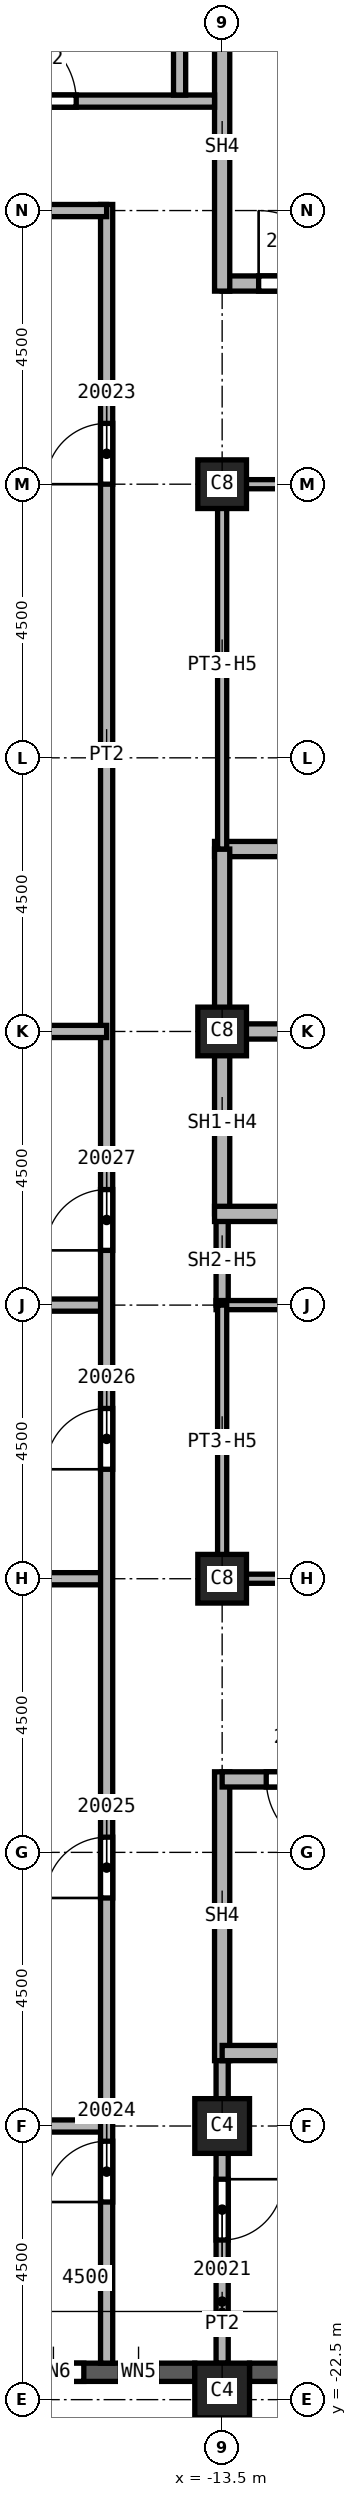
"""IFC4 building model, lengths in metres.
Left out: names, types, materials, properties, quantities, classifications, styles, units other than length and angle.
Written with IfcOpenShell. Run it as: python <this file> out.ifc"""

import sys

from ifc_helpers import new_model, si_unit, direction, frame, frame_2d, origin, origin_2d, place, context, subcontext, project, spatial, rectangle, extrude, element, fill, save


model = new_model("IFC4")
c1 = context("Model", 3, precision=1e-05, world=origin(), true_north=direction((0.0, 1.0)))
c2 = subcontext(c1, "Body", "Model", "MODEL_VIEW")
j1 = project(units=[si_unit("LENGTHUNIT", "METRE"), si_unit("PLANEANGLEUNIT", "RADIAN")], contexts=[c1])
p1 = place(None, origin())
s1 = spatial("IfcSite", under=j1, at=p1, CompositionType="ELEMENT")
p2 = place(p1, origin())
s2 = spatial("IfcBuilding", under=s1, at=p2, CompositionType="ELEMENT")
p3 = place(p2, frame((0.0, 0.0, 290.0)))
s3 = spatial("IfcBuildingStorey", under=s2, at=p3, CompositionType="ELEMENT", Elevation=290.0)
p4 = place(p3, frame((-13.5, -18.0, 0.0), z_axis=(0.0, 0.0, 1.0), x_axis=(1.0, 0.0, 0.0)))
e1 = element("IfcColumn", 1, at=p4, inside=s3, PredefinedType="COLUMN", context=c2, shape_type="SweptSolid", body=[
    extrude(rectangle(XDim=0.9, YDim=0.9, at=origin_2d()), origin(), (0.0, 0.0, 1.0), 3.59),
])
for number, where, z_axis, x_axis in (
    (2, (-13.5, 0.0, 0.0), (0.0, 0.0, 1.0), (1.0, 0.0, 0.0)),
    (3, (-13.5, 9.0, 0.0), (0.0, 0.0, 1.0), (1.0, 0.0, 0.0)),
    (4, (-13.5, -9.0, 0.0), (0.0, 0.0, 1.0), (1.0, 0.0, 0.0)),
):
    element("IfcColumn", number, at=place(p3, frame(where, z_axis=z_axis, x_axis=x_axis)), inside=s3, PredefinedType="COLUMN", context=c2, shape_type="SweptSolid", body=[
        extrude(rectangle(XDim=0.8, YDim=0.8, at=origin_2d()), origin(), (0.0, 0.0, 1.0), 3.59),
    ])
p5 = place(p3, frame((-13.5, -22.35, 0.0), z_axis=(0.0, 0.0, 1.0), x_axis=(1.0, 0.0, 0.0)))
e5 = element("IfcColumn", 5, at=p5, inside=s3, PredefinedType="COLUMN", context=c2, shape_type="SweptSolid", body=[
    extrude(rectangle(XDim=0.9, YDim=0.9, at=origin_2d()), origin(), (0.0, 0.0, 1.0), 3.59),
])
p6 = place(p3, frame((-17.55, -22.05, 0.0), z_axis=(0.0, 0.0, 1.0), x_axis=(1.0, 0.0, 0.0)))
e6 = element("IfcWall", 6, at=p6, inside=s3, PredefinedType="SOLIDWALL", context=c2, shape_type="SweptSolid", body=[
    extrude(rectangle(XDim=3.6, YDim=0.3, at=frame_2d((1.8, 0.0))), origin(), (0.0, 0.0, 1.0), 2.99),
])
p7 = place(p6, frame((0.775, 0.0, 0.8)))
e7 = element("IfcOpeningElement", 7, at=p7, cuts=e6, PredefinedType="OPENING", context=c2, shape_type="SweptSolid", body=[
    extrude(rectangle(XDim=1.0, YDim=1.95, at=frame_2d((0.5, 0.975))), frame((0.0, 0.15, 0.0), z_axis=(0.0, -1.0, 0.0), x_axis=(1.0, 0.0, 0.0)), (0.0, 0.0, 1.0), 0.3),
])
p8 = place(p6, frame((2.375, 0.0, 0.8)))
e8 = element("IfcOpeningElement", 8, at=p8, cuts=e6, PredefinedType="OPENING", context=c2, shape_type="SweptSolid", body=[
    extrude(rectangle(XDim=0.6, YDim=1.95, at=frame_2d((0.3, 0.975))), frame((0.0, 0.15, 0.0), z_axis=(0.0, -1.0, 0.0), x_axis=(1.0, 0.0, 0.0)), (0.0, 0.0, 1.0), 0.3),
])
p9 = place(p3, frame((-13.05, -22.05, 0.0), z_axis=(0.0, 0.0, 1.0), x_axis=(1.0, 0.0, 0.0)))
e9 = element("IfcWall", 9, at=p9, inside=s3, PredefinedType="SOLIDWALL", context=c2, shape_type="SweptSolid", body=[
    extrude(rectangle(XDim=3.6, YDim=0.3, at=frame_2d((1.8, 0.0))), origin(), (0.0, 0.0, 1.0), 2.99),
])
p10 = place(p9, frame((0.6, 0.0, 0.8)))
e10 = element("IfcOpeningElement", 10, at=p10, cuts=e9, PredefinedType="OPENING", context=c2, shape_type="SweptSolid", body=[
    extrude(rectangle(XDim=2.4, YDim=1.95, at=frame_2d((1.2, 0.975))), frame((0.0, 0.15, 0.0), z_axis=(0.0, -1.0, 0.0), x_axis=(1.0, 0.0, 0.0)), (0.0, 0.0, 1.0), 0.3),
])
for number, where, z_axis, x_axis in (
    (11, (-26.55, -9.0, 0.0), (0.0, 0.0, 1.0), (1.0, 0.0, 0.0)),
    (12, (-26.55, -4.5, 0.0), (0.0, 0.0, 1.0), (1.0, 0.0, 0.0)),
):
    element("IfcWall", number, at=place(p3, frame(where, z_axis=z_axis, x_axis=x_axis)), inside=s3, PredefinedType="PARTITIONING", context=c2, shape_type="SweptSolid", body=[
        extrude(rectangle(XDim=11.15, YDim=0.2, at=frame_2d((5.575, 0.0))), origin(), (0.0, 0.0, 1.0), 3.59),
    ])
p11 = place(p3, frame((-24.3, -18.0, 0.0), z_axis=(0.0, 0.0, 1.0), x_axis=(1.0, 0.0, 0.0)))
e13 = element("IfcWall", 13, at=p11, inside=s3, PredefinedType="PARTITIONING", context=c2, shape_type="SweptSolid", body=[
    extrude(rectangle(XDim=8.9, YDim=0.2, at=frame_2d((4.45, 0.0))), origin(), (0.0, 0.0, 1.0), 3.59),
])
p12 = place(p3, frame((-15.4, -21.9, 0.0), z_axis=(0.0, 0.0, 1.0), x_axis=(0.0, 1.0, 0.0)))
e14 = element("IfcWall", 14, at=p12, inside=s3, PredefinedType="PARTITIONING", context=c2, shape_type="SweptSolid", body=[
    extrude(rectangle(XDim=35.5, YDim=0.2, at=frame_2d((17.75, 0.0))), origin(), (0.0, 0.0, 1.0), 3.59),
])
p13 = place(p12, frame((30.9, 0.0, 0.0)))
e15 = element("IfcOpeningElement", 15, at=p13, cuts=e14, PredefinedType="OPENING", context=c2, shape_type="SweptSolid", body=[
    extrude(rectangle(XDim=1.0, YDim=2.1, at=frame_2d((0.5, 1.05))), frame((0.0, 0.1, 0.0), z_axis=(0.0, -1.0, 0.0), x_axis=(1.0, 0.0, 0.0)), (0.0, 0.0, 1.0), 0.2),
])
p14 = place(p12, frame((2.65, 0.0, 0.0)))
e16 = element("IfcOpeningElement", 16, at=p14, cuts=e14, PredefinedType="OPENING", context=c2, shape_type="SweptSolid", body=[
    extrude(rectangle(XDim=1.0, YDim=2.1, at=frame_2d((0.5, 1.05))), frame((0.0, 0.1, 0.0), z_axis=(0.0, -1.0, 0.0), x_axis=(1.0, 0.0, 0.0)), (0.0, 0.0, 1.0), 0.2),
])
p15 = place(p12, frame((7.65, 0.0, 0.0)))
e17 = element("IfcOpeningElement", 17, at=p15, cuts=e14, PredefinedType="OPENING", context=c2, shape_type="SweptSolid", body=[
    extrude(rectangle(XDim=1.0, YDim=2.1, at=frame_2d((0.5, 1.05))), frame((0.0, 0.1, 0.0), z_axis=(0.0, -1.0, 0.0), x_axis=(1.0, 0.0, 0.0)), (0.0, 0.0, 1.0), 0.2),
])
p16 = place(p12, frame((14.7, 0.0, 0.0)))
e18 = element("IfcOpeningElement", 18, at=p16, cuts=e14, PredefinedType="OPENING", context=c2, shape_type="SweptSolid", body=[
    extrude(rectangle(XDim=1.0, YDim=2.1, at=frame_2d((0.5, 1.05))), frame((0.0, 0.1, 0.0), z_axis=(0.0, -1.0, 0.0), x_axis=(1.0, 0.0, 0.0)), (0.0, 0.0, 1.0), 0.2),
])
p17 = place(p12, frame((18.3, 0.0, 0.0)))
e19 = element("IfcOpeningElement", 19, at=p17, cuts=e14, PredefinedType="OPENING", context=c2, shape_type="SweptSolid", body=[
    extrude(rectangle(XDim=1.0, YDim=2.1, at=frame_2d((0.5, 1.05))), frame((0.0, 0.1, 0.0), z_axis=(0.0, -1.0, 0.0), x_axis=(1.0, 0.0, 0.0)), (0.0, 0.0, 1.0), 0.2),
])
p18 = place(p3, frame((-15.4, 0.0, 0.0), z_axis=(0.0, 0.0, 1.0), x_axis=(-1.0, 0.0, 0.0)))
e20 = element("IfcWall", 20, at=p18, inside=s3, PredefinedType="PARTITIONING", context=c2, shape_type="SweptSolid", body=[
    extrude(rectangle(XDim=11.15, YDim=0.2, at=frame_2d((5.575, 0.0))), origin(), (0.0, 0.0, 1.0), 3.59),
])
p19 = place(p3, frame((-15.4, 13.5, 0.0), z_axis=(0.0, 0.0, 1.0), x_axis=(-1.0, 0.0, 0.0)))
e21 = element("IfcWall", 21, at=p19, inside=s3, PredefinedType="PARTITIONING", context=c2, shape_type="SweptSolid", body=[
    extrude(rectangle(XDim=6.6, YDim=0.2, at=frame_2d((3.3, 0.0))), origin(), (0.0, 0.0, 1.0), 3.59),
])
p20 = place(p3, frame((-13.5, -16.675, 0.0), z_axis=(0.0, 0.0, 1.0), x_axis=(0.0, -1.0, 0.0)))
e22 = element("IfcWall", 22, at=p20, inside=s3, PredefinedType="PARTITIONING", context=c2, shape_type="SweptSolid", body=[
    extrude(rectangle(XDim=5.225, YDim=0.2, at=frame_2d((2.612, 0.0))), origin(), (0.0, 0.0, 1.0), 3.59),
])
p21 = place(p20, frame((2.2, 0.0, 0.0)))
e23 = element("IfcOpeningElement", 23, at=p21, cuts=e22, PredefinedType="OPENING", context=c2, shape_type="SweptSolid", body=[
    extrude(rectangle(XDim=1.0, YDim=2.1, at=frame_2d((0.5, 1.05))), frame((0.0, 0.1, 0.0), z_axis=(0.0, -1.0, 0.0), x_axis=(1.0, 0.0, 0.0)), (0.0, 0.0, 1.0), 0.2),
])
p22 = place(p3, frame((-13.5, -4.5, 0.0), z_axis=(0.0, 0.0, 1.0), x_axis=(0.0, 1.0, 0.0)))
e24 = element("IfcWall", 24, at=p22, inside=s3, PredefinedType="SOLIDWALL", context=c2, shape_type="SweptSolid", body=[
    extrude(rectangle(XDim=1.5, YDim=0.2, at=frame_2d((0.75, 0.0))), origin(), (0.0, 0.0, 1.0), 2.828),
])
p23 = place(p3, frame((-13.625, 0.0, 0.0), z_axis=(0.0, 0.0, 1.0), x_axis=(1.0, 0.0, 0.0)))
e25 = element("IfcWall", 25, at=p23, inside=s3, PredefinedType="SOLIDWALL", context=c2, shape_type="SweptSolid", body=[
    extrude(rectangle(XDim=3.125, YDim=0.25, at=frame_2d((1.562, 0.0))), origin(), (0.0, 0.0, 1.0), 3.59),
])
p24 = place(p3, frame((-13.625, 3.0, 0.0), z_axis=(0.0, 0.0, 1.0), x_axis=(1.0, 0.0, 0.0)))
e26 = element("IfcWall", 26, at=p24, inside=s3, PredefinedType="SOLIDWALL", context=c2, shape_type="SweptSolid", body=[
    extrude(rectangle(XDim=9.25, YDim=0.25, at=frame_2d((4.625, 0.0))), origin(), (0.0, 0.0, 1.0), 3.59),
])
p25 = place(p24, frame((3.25, 0.0, 0.0)))
e27 = element("IfcOpeningElement", 27, at=p25, cuts=e26, PredefinedType="OPENING", context=c2, shape_type="SweptSolid", body=[
    extrude(rectangle(XDim=1.1, YDim=2.1, at=frame_2d((0.55, 1.05))), frame((0.0, 0.125, 0.0), z_axis=(0.0, -1.0, 0.0), x_axis=(1.0, 0.0, 0.0)), (0.0, 0.0, 1.0), 0.25),
])
p26 = place(p3, frame((-13.5, -3.0, 0.0), z_axis=(0.0, 0.0, 1.0), x_axis=(0.0, 1.0, 0.0)))
e28 = element("IfcWall", 28, at=p26, inside=s3, PredefinedType="SOLIDWALL", context=c2, shape_type="SweptSolid", body=[
    extrude(rectangle(XDim=6.0, YDim=0.25, at=frame_2d((3.0, 0.0))), origin(), (0.0, 0.0, 1.0), 2.828),
])
p27 = place(p3, frame((-13.625, -3.0, 0.0), z_axis=(0.0, 0.0, 1.0), x_axis=(1.0, 0.0, 0.0)))
e29 = element("IfcWall", 29, at=p27, inside=s3, PredefinedType="SOLIDWALL", context=c2, shape_type="SweptSolid", body=[
    extrude(rectangle(XDim=6.125, YDim=0.25, at=frame_2d((3.062, 0.0))), origin(), (0.0, 0.0, 1.0), 3.59),
])
p28 = place(p27, frame((3.25, 0.0, 0.0)))
e30 = element("IfcOpeningElement", 30, at=p28, cuts=e29, PredefinedType="OPENING", context=c2, shape_type="SweptSolid", body=[
    extrude(rectangle(XDim=1.1, YDim=2.1, at=frame_2d((0.55, 1.05))), frame((0.0, 0.125, 0.0), z_axis=(0.0, -1.0, 0.0), x_axis=(1.0, 0.0, 0.0)), (0.0, 0.0, 1.0), 0.25),
])
p29 = place(p3, frame((-13.5, -12.175, 0.0), z_axis=(0.0, 0.0, 1.0), x_axis=(0.0, -1.0, 0.0)))
e31 = element("IfcWall", 31, at=p29, inside=s3, PredefinedType="SOLIDWALL", context=c2, shape_type="SweptSolid", body=[
    extrude(rectangle(XDim=4.75, YDim=0.25, at=frame_2d((2.375, 0.0))), origin(), (0.0, 0.0, 1.0), 3.59),
])
p30 = place(p3, frame((-13.5, 12.3, 0.0), z_axis=(0.0, 0.0, 1.0), x_axis=(1.0, 0.0, 0.0)))
e32 = element("IfcWall", 32, at=p30, inside=s3, PredefinedType="SOLIDWALL", context=c2, shape_type="SweptSolid", body=[
    extrude(rectangle(XDim=9.125, YDim=0.25, at=frame_2d((4.562, 0.0))), origin(), (0.0, 0.0, 1.0), 3.59),
])
p31 = place(p30, frame((0.6, 0.0, 0.0)))
e33 = element("IfcOpeningElement", 33, at=p31, cuts=e32, PredefinedType="OPENING", context=c2, shape_type="SweptSolid", body=[
    extrude(rectangle(XDim=1.2, YDim=2.1, at=frame_2d((0.6, 1.05))), frame((0.0, 0.125, 0.0), z_axis=(0.0, -1.0, 0.0), x_axis=(1.0, 0.0, 0.0)), (0.0, 0.0, 1.0), 0.25),
])
p32 = place(p3, frame((-13.5, 16.78, 0.0), z_axis=(0.0, 0.0, 1.0), x_axis=(0.0, -1.0, 0.0)))
e34 = element("IfcWall", 34, at=p32, inside=s3, PredefinedType="SOLIDWALL", context=c2, shape_type="SweptSolid", body=[
    extrude(rectangle(XDim=4.605, YDim=0.25, at=frame_2d((2.302, 0.0))), origin(), (0.0, 0.0, 1.0), 3.59),
])
p33 = place(p3, frame((-4.5, -16.8, 0.0), z_axis=(0.0, 0.0, 1.0), x_axis=(-1.0, 0.0, 0.0)))
e35 = element("IfcWall", 35, at=p33, inside=s3, PredefinedType="SOLIDWALL", context=c2, shape_type="SweptSolid", body=[
    extrude(rectangle(XDim=9.0, YDim=0.25, at=frame_2d((4.5, 0.0))), origin(), (0.0, 0.0, 1.0), 3.59),
])
p34 = place(p3, frame((-4.375, -12.3, 0.0), z_axis=(0.0, 0.0, 1.0), x_axis=(-1.0, 0.0, 0.0)))
e36 = element("IfcWall", 36, at=p34, inside=s3, PredefinedType="SOLIDWALL", context=c2, shape_type="SweptSolid", body=[
    extrude(rectangle(XDim=9.125, YDim=0.25, at=frame_2d((4.562, 0.0))), origin(), (0.0, 0.0, 1.0), 3.59),
])
p35 = place(p34, frame((7.2, 0.0, 0.0)))
e37 = element("IfcOpeningElement", 37, at=p35, cuts=e36, PredefinedType="OPENING", context=c2, shape_type="SweptSolid", body=[
    extrude(rectangle(XDim=1.2, YDim=2.1, at=frame_2d((0.6, 1.05))), frame((0.0, 0.125, 0.0), z_axis=(0.0, -1.0, 0.0), x_axis=(1.0, 0.0, 0.0)), (0.0, 0.0, 1.0), 0.25),
])
p36 = place(p3, frame((-13.6, -4.5, 0.0), z_axis=(0.0, 0.0, 1.0), x_axis=(1.0, 0.0, 0.0)))
e38 = element("IfcWall", 38, at=p36, inside=s3, PredefinedType="PARTITIONING", context=c2, shape_type="SweptSolid", body=[
    extrude(rectangle(XDim=3.1, YDim=0.15, at=frame_2d((1.55, 0.0))), origin(), (0.0, 0.0, 1.0), 3.59),
])
p37 = place(p3, frame((-13.5, -9.075, 0.0), z_axis=(0.0, 0.0, 1.0), x_axis=(0.0, 1.0, 0.0)))
e39 = element("IfcWall", 39, at=p37, inside=s3, PredefinedType="PARTITIONING", context=c2, shape_type="SweptSolid", body=[
    extrude(rectangle(XDim=4.575, YDim=0.15, at=frame_2d((2.288, 0.0))), origin(), (0.0, 0.0, 1.0), 2.828),
])
p38 = place(p3, frame((-13.5, 3.0, 0.0), z_axis=(0.0, 0.0, 1.0), x_axis=(0.0, 1.0, 0.0)))
e40 = element("IfcWall", 40, at=p38, inside=s3, PredefinedType="PARTITIONING", context=c2, shape_type="SweptSolid", body=[
    extrude(rectangle(XDim=6.075, YDim=0.15, at=frame_2d((3.038, 0.0))), origin(), (0.0, 0.0, 1.0), 2.828),
])
for number, where, z_axis, x_axis in (
    (41, (-13.5, 9.0, 0.0), (0.0, 0.0, 1.0), (1.0, 0.0, 0.0)),
    (42, (-10.5, -9.0, 0.0), (0.0, 0.0, 1.0), (-1.0, 0.0, 0.0)),
):
    element("IfcWall", number, at=place(p3, frame(where, z_axis=z_axis, x_axis=x_axis)), inside=s3, PredefinedType="PARTITIONING", context=c2, shape_type="SweptSolid", body=[
        extrude(rectangle(XDim=3.0, YDim=0.15, at=frame_2d((1.5, 0.0))), origin(), (0.0, 0.0, 1.0), 2.828),
    ])
p39 = place(p3, frame((-21.9, 15.3, 0.0), z_axis=(0.0, 0.0, 1.0), x_axis=(1.0, 0.0, 0.0)))
e43 = element("IfcWall", 43, at=p39, inside=s3, PredefinedType="SOLIDWALL", context=c2, shape_type="SweptSolid", body=[
    extrude(rectangle(XDim=8.275, YDim=0.2, at=frame_2d((4.137, 0.0))), origin(), (0.0, 0.0, 1.0), 3.59),
])
p40 = place(p39, frame((4.8, 0.0, 0.0)))
e44 = element("IfcOpeningElement", 44, at=p40, cuts=e43, PredefinedType="OPENING", context=c2, shape_type="SweptSolid", body=[
    extrude(rectangle(XDim=1.2, YDim=2.1, at=frame_2d((0.6, 1.05))), frame((0.0, 0.1, 0.0), z_axis=(0.0, -1.0, 0.0), x_axis=(1.0, 0.0, 0.0)), (0.0, 0.0, 1.0), 0.2),
])
p41 = place(p3, frame((-14.2, 15.4, 0.0), z_axis=(0.0, 0.0, 1.0), x_axis=(0.0, 1.0, 0.0)))
e45 = element("IfcWall", 45, at=p41, inside=s3, PredefinedType="SOLIDWALL", context=c2, shape_type="SweptSolid", body=[
    extrude(rectangle(XDim=5.9, YDim=0.2, at=frame_2d((2.95, 0.0))), origin(), (0.0, 0.0, 1.0), 3.59),
])
p42 = place(p31, origin())
e46 = element("IfcDoor", 46, at=p42, inside=s3, OperationType="SINGLE_SWING_LEFT", PredefinedType="DOOR", context=c2, shape_type="SweptSolid", body=[
    extrude(rectangle(XDim=1.2, YDim=2.1, at=frame_2d((0.6, 1.05))), frame((0.0, 0.025, 0.0), z_axis=(0.0, -1.0, 0.0), x_axis=(1.0, 0.0, 0.0)), (0.0, 0.0, 1.0), 0.05),
])
fill(e33, e46)
p43 = place(p35, origin())
e47 = element("IfcDoor", 47, at=p43, inside=s3, OperationType="SINGLE_SWING_RIGHT", PredefinedType="DOOR", context=c2, shape_type="SweptSolid", body=[
    extrude(rectangle(XDim=1.2, YDim=2.1, at=frame_2d((0.6, 1.05))), frame((0.0, 0.025, 0.0), z_axis=(0.0, -1.0, 0.0), x_axis=(1.0, 0.0, 0.0)), (0.0, 0.0, 1.0), 0.05),
])
fill(e37, e47)
p44 = place(p21, origin())
e48 = element("IfcDoor", 48, at=p44, inside=s3, OperationType="SINGLE_SWING_RIGHT", PredefinedType="DOOR", context=c2, shape_type="SweptSolid", body=[
    extrude(rectangle(XDim=1.0, YDim=2.1, at=frame_2d((0.5, 1.05))), frame((0.0, 0.025, 0.0), z_axis=(0.0, -1.0, 0.0), x_axis=(1.0, 0.0, 0.0)), (0.0, 0.0, 1.0), 0.05),
])
fill(e23, e48)
p45 = place(p13, origin())
e49 = element("IfcDoor", 49, at=p45, inside=s3, OperationType="SINGLE_SWING_RIGHT", PredefinedType="DOOR", context=c2, shape_type="SweptSolid", body=[
    extrude(rectangle(XDim=1.0, YDim=2.1, at=frame_2d((0.5, 1.05))), frame((0.0, 0.025, 0.0), z_axis=(0.0, -1.0, 0.0), x_axis=(1.0, 0.0, 0.0)), (0.0, 0.0, 1.0), 0.05),
])
fill(e15, e49)
p46 = place(p14, origin())
e50 = element("IfcDoor", 50, at=p46, inside=s3, OperationType="SINGLE_SWING_LEFT", PredefinedType="DOOR", context=c2, shape_type="SweptSolid", body=[
    extrude(rectangle(XDim=1.0, YDim=2.1, at=frame_2d((0.5, 1.05))), frame((0.0, 0.025, 0.0), z_axis=(0.0, -1.0, 0.0), x_axis=(1.0, 0.0, 0.0)), (0.0, 0.0, 1.0), 0.05),
])
fill(e16, e50)
p47 = place(p15, origin())
e51 = element("IfcDoor", 51, at=p47, inside=s3, OperationType="SINGLE_SWING_RIGHT", PredefinedType="DOOR", context=c2, shape_type="SweptSolid", body=[
    extrude(rectangle(XDim=1.0, YDim=2.1, at=frame_2d((0.5, 1.05))), frame((0.0, 0.025, 0.0), z_axis=(0.0, -1.0, 0.0), x_axis=(1.0, 0.0, 0.0)), (0.0, 0.0, 1.0), 0.05),
])
fill(e17, e51)
p48 = place(p16, origin())
e52 = element("IfcDoor", 52, at=p48, inside=s3, OperationType="SINGLE_SWING_LEFT", PredefinedType="DOOR", context=c2, shape_type="SweptSolid", body=[
    extrude(rectangle(XDim=1.0, YDim=2.1, at=frame_2d((0.5, 1.05))), frame((0.0, 0.025, 0.0), z_axis=(0.0, -1.0, 0.0), x_axis=(1.0, 0.0, 0.0)), (0.0, 0.0, 1.0), 0.05),
])
fill(e18, e52)
p49 = place(p17, origin())
e53 = element("IfcDoor", 53, at=p49, inside=s3, OperationType="SINGLE_SWING_RIGHT", PredefinedType="DOOR", context=c2, shape_type="SweptSolid", body=[
    extrude(rectangle(XDim=1.0, YDim=2.1, at=frame_2d((0.5, 1.05))), frame((0.0, 0.025, 0.0), z_axis=(0.0, -1.0, 0.0), x_axis=(1.0, 0.0, 0.0)), (0.0, 0.0, 1.0), 0.05),
])
fill(e19, e53)
p50 = place(p40, origin())
e54 = element("IfcDoor", 54, at=p50, inside=s3, OperationType="SINGLE_SWING_RIGHT", PredefinedType="DOOR", context=c2, shape_type="SweptSolid", body=[
    extrude(rectangle(XDim=1.2, YDim=2.1, at=frame_2d((0.6, 1.05))), frame((0.0, 0.025, 0.0), z_axis=(0.0, -1.0, 0.0), x_axis=(1.0, 0.0, 0.0)), (0.0, 0.0, 1.0), 0.05),
])
fill(e44, e54)
p51 = place(p7, origin())
e55 = element("IfcWindow", 55, at=p51, inside=s3, PartitioningType="SINGLE_PANEL", PredefinedType="WINDOW", context=c2, shape_type="SweptSolid", body=[
    extrude(rectangle(XDim=1.0, YDim=1.95, at=frame_2d((0.5, 0.975))), frame((0.0, 0.03, 0.0), z_axis=(0.0, -1.0, 0.0), x_axis=(1.0, 0.0, 0.0)), (0.0, 0.0, 1.0), 0.06),
])
fill(e7, e55)
p52 = place(p8, origin())
e56 = element("IfcWindow", 56, at=p52, inside=s3, PartitioningType="SINGLE_PANEL", PredefinedType="WINDOW", context=c2, shape_type="SweptSolid", body=[
    extrude(rectangle(XDim=0.6, YDim=1.95, at=frame_2d((0.3, 0.975))), frame((0.0, 0.03, 0.0), z_axis=(0.0, -1.0, 0.0), x_axis=(1.0, 0.0, 0.0)), (0.0, 0.0, 1.0), 0.06),
])
fill(e8, e56)
save(model, sys.argv[1])
